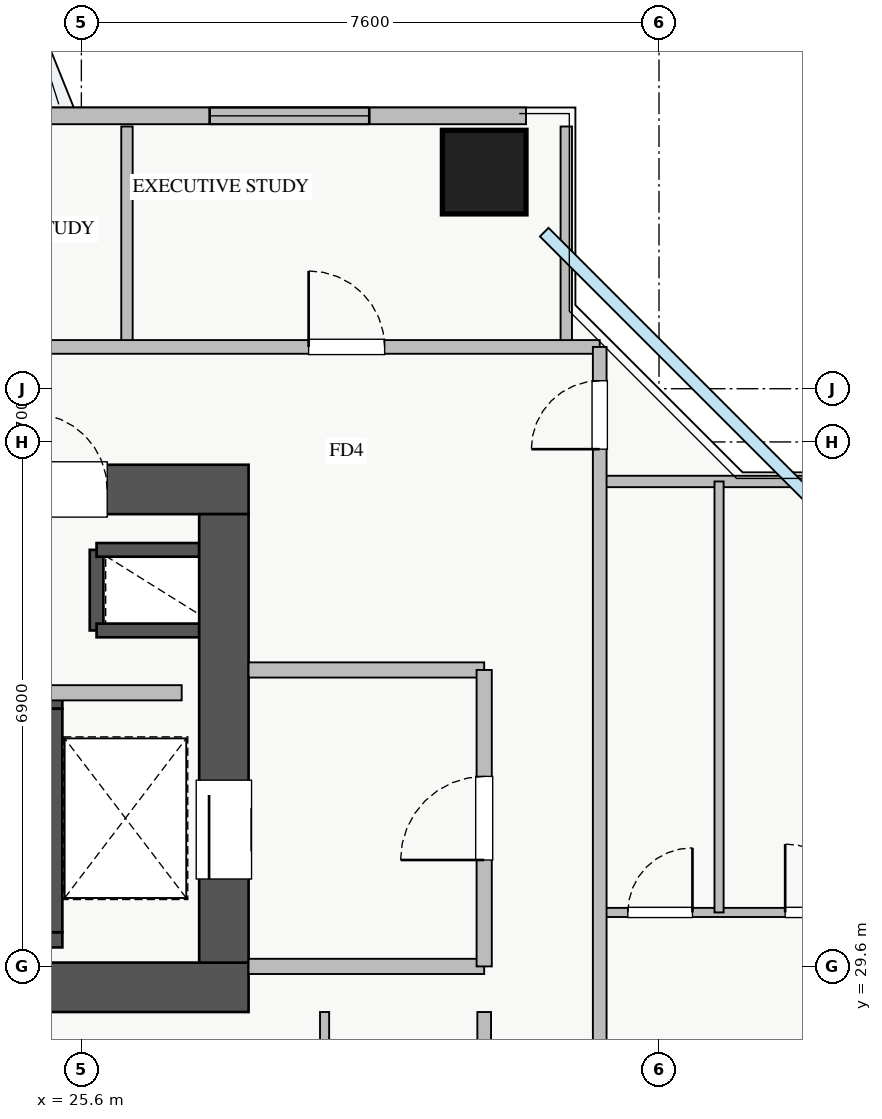
"""IFC4 building model, lengths in metres.
Left out: names, types, materials, properties, quantities, classifications, styles, units other than length and angle.
Written with IfcOpenShell. Run it as: python <this file> out.ifc"""

import sys

from ifc_helpers import new_model, si_unit, direction, frame, frame_2d, origin, origin_2d, place, context, subcontext, project, spatial, rectangle, extrude, source, transform, mapped, element, fill, save


model = new_model("IFC4")
c1 = context("Model", 3, precision=1e-05, world=origin(), true_north=direction((0.0, 1.0)))
c2 = subcontext(c1, "Body", "Model", "MODEL_VIEW")
j1 = project(units=[si_unit("LENGTHUNIT", "METRE"), si_unit("PLANEANGLEUNIT", "RADIAN")], contexts=[c1])
p1 = place(None, origin())
s1 = spatial("IfcSite", under=j1, at=p1, CompositionType="ELEMENT")
p2 = place(p1, origin())
s2 = spatial("IfcBuilding", under=s1, at=p2, CompositionType="ELEMENT")
p3 = place(p2, frame((0.0, 0.0, 116.5)))
s3 = spatial("IfcBuildingStorey", under=s2, at=p3, CompositionType="ELEMENT", Elevation=116.5)
p4 = place(p3, frame((25.8, 34.02, 0.0), z_axis=(0.0, 0.0, 1.0), x_axis=(0.0, 1.0, 0.0)))
e1 = element("IfcWall", 1, at=p4, inside=s3, PredefinedType="SHEAR", context=c2, shape_type="SweptSolid", body=[
    extrude(rectangle(XDim=1.06, YDim=0.18, at=frame_2d((0.53, 0.0))), origin(), (0.0, 0.0, 1.0), 3.07),
])
for number, where, z_axis, x_axis in (
    (2, (25.8, 35.08, 0.0), (0.0, 0.0, 1.0), (1.0, 0.0, 0.0)),
    (3, (25.8, 34.02, 0.0), (0.0, 0.0, 1.0), (1.0, 0.0, 0.0)),
):
    element("IfcWall", number, at=place(p3, frame(where, z_axis=z_axis, x_axis=x_axis)), inside=s3, PredefinedType="SHEAR", context=c2, shape_type="SweptSolid", body=[
        extrude(rectangle(XDim=1.35, YDim=0.18, at=frame_2d((0.675, 0.0))), origin(), (0.0, 0.0, 1.0), 3.07),
    ])
p5 = place(p3, frame((18.2, 29.95, 0.0), z_axis=(0.0, 0.0, 1.0), x_axis=(1.0, 0.0, 0.0)))
e4 = element("IfcWall", 4, at=p5, inside=s3, PredefinedType="SHEAR", context=c2, shape_type="SweptSolid", body=[
    extrude(rectangle(XDim=7.15, YDim=0.2, at=frame_2d((3.575, 0.0))), origin(), (0.0, 0.0, 1.0), 3.25),
])
p6 = place(p3, frame((18.2, 33.09, 0.0), z_axis=(0.0, 0.0, 1.0), x_axis=(1.0, 0.0, 0.0)))
e5 = element("IfcWall", 5, at=p6, inside=s3, PredefinedType="SHEAR", context=c2, shape_type="SweptSolid", body=[
    extrude(rectangle(XDim=7.15, YDim=0.2, at=frame_2d((3.575, 0.0))), origin(), (0.0, 0.0, 1.0), 3.25),
])
p7 = place(p6, frame((0.35, 0.0, 0.0)))
e6 = element("IfcOpeningElement", 6, at=p7, cuts=e5, PredefinedType="OPENING", context=c2, shape_type="SweptSolid", body=[
    extrude(rectangle(XDim=1.1, YDim=2.05, at=frame_2d((0.55, 1.025))), frame((0.0, 0.11, 0.0), z_axis=(0.0, -1.0, 0.0), x_axis=(1.0, 0.0, 0.0)), (0.0, 0.0, 1.0), 0.22),
])
p8 = place(p3, frame((25.25, 30.05, 0.0), z_axis=(0.0, 0.0, 1.0), x_axis=(0.0, 1.0, 0.0)))
e7 = element("IfcWall", 7, at=p8, inside=s3, PredefinedType="SHEAR", context=c2, shape_type="SweptSolid", body=[
    extrude(rectangle(XDim=2.94, YDim=0.2, at=frame_2d((1.47, 0.0))), origin(), (0.0, 0.0, 1.0), 3.25),
])
p9 = place(p3, frame((10.2, 29.325, 0.0), z_axis=(0.0, 0.0, 1.0), x_axis=(1.0, 0.0, 0.0)))
e8 = element("IfcWall", 8, at=p9, inside=s3, PredefinedType="SHEAR", context=c2, shape_type="SweptSolid", body=[
    extrude(rectangle(XDim=17.6, YDim=0.65, at=frame_2d((8.8, 0.0))), origin(), (0.0, 0.0, 1.0), 3.25),
])
p10 = place(p3, frame((10.2, 35.875, 0.0), z_axis=(0.0, 0.0, 1.0), x_axis=(1.0, 0.0, 0.0)))
e9 = element("IfcWall", 9, at=p10, inside=s3, PredefinedType="SHEAR", context=c2, shape_type="SweptSolid", body=[
    extrude(rectangle(XDim=17.6, YDim=0.65, at=frame_2d((8.8, 0.0))), origin(), (0.0, 0.0, 1.0), 3.25),
])
p11 = place(p10, frame((1.15, 0.0, 0.0)))
e10 = element("IfcOpeningElement", 10, at=p11, cuts=e9, PredefinedType="OPENING", context=c2, shape_type="SweptSolid", body=[
    extrude(rectangle(XDim=1.1, YDim=2.05, at=frame_2d((0.55, 1.025))), frame((0.0, 0.335, 0.0), z_axis=(0.0, -1.0, 0.0), x_axis=(1.0, 0.0, 0.0)), (0.0, 0.0, 1.0), 0.67),
])
p12 = place(p10, frame((8.3, 0.0, 0.0)))
e11 = element("IfcOpeningElement", 11, at=p12, cuts=e9, PredefinedType="OPENING", context=c2, shape_type="SweptSolid", body=[
    extrude(rectangle(XDim=1.1, YDim=2.05, at=frame_2d((0.55, 1.025))), frame((0.0, 0.335, 0.0), z_axis=(0.0, -1.0, 0.0), x_axis=(1.0, 0.0, 0.0)), (0.0, 0.0, 1.0), 0.67),
])
p13 = place(p10, frame((4.9, 0.0, 0.0)))
e12 = element("IfcOpeningElement", 12, at=p13, cuts=e9, PredefinedType="OPENING", context=c2, shape_type="SweptSolid", body=[
    extrude(rectangle(XDim=1.1, YDim=2.05, at=frame_2d((0.55, 1.025))), frame((0.0, 0.335, 0.0), z_axis=(0.0, -1.0, 0.0), x_axis=(1.0, 0.0, 0.0)), (0.0, 0.0, 1.0), 0.67),
])
p14 = place(p10, frame((14.74, 0.0, 0.0)))
e13 = element("IfcOpeningElement", 13, at=p14, cuts=e9, PredefinedType="OPENING", context=c2, shape_type="SweptSolid", body=[
    extrude(rectangle(XDim=1.0, YDim=2.05, at=frame_2d((0.5, 1.025))), frame((0.0, 0.335, 0.0), z_axis=(0.0, -1.0, 0.0), x_axis=(1.0, 0.0, 0.0)), (0.0, 0.0, 1.0), 0.67),
])
p15 = place(p10, frame((10.175, 0.0, 0.0)))
e14 = element("IfcOpeningElement", 14, at=p15, cuts=e9, PredefinedType="OPENING", context=c2, shape_type="SweptSolid", body=[
    extrude(rectangle(XDim=1.0, YDim=2.05, at=frame_2d((0.5, 1.025))), frame((0.0, 0.335, 0.0), z_axis=(0.0, -1.0, 0.0), x_axis=(1.0, 0.0, 0.0)), (0.0, 0.0, 1.0), 0.67),
])
p16 = place(p10, frame((12.625, 0.0, 0.0)))
e15 = element("IfcOpeningElement", 15, at=p16, cuts=e9, PredefinedType="OPENING", context=c2, shape_type="SweptSolid", body=[
    extrude(rectangle(XDim=1.0, YDim=2.05, at=frame_2d((0.5, 1.025))), frame((0.0, 0.335, 0.0), z_axis=(0.0, -1.0, 0.0), x_axis=(1.0, 0.0, 0.0)), (0.0, 0.0, 1.0), 0.67),
])
p17 = place(p3, frame((27.475, 29.65, 0.0), z_axis=(0.0, 0.0, 1.0), x_axis=(0.0, 1.0, 0.0)))
e16 = element("IfcWall", 16, at=p17, inside=s3, PredefinedType="SHEAR", context=c2, shape_type="SweptSolid", body=[
    extrude(rectangle(XDim=5.9, YDim=0.65, at=frame_2d((2.95, 0.0))), origin(), (0.0, 0.0, 1.0), 3.25),
])
p18 = place(p17, frame((1.1, 0.0, 0.0)))
e17 = element("IfcOpeningElement", 17, at=p18, cuts=e16, PredefinedType="OPENING", context=c2, shape_type="SweptSolid", body=[
    extrude(rectangle(XDim=1.3, YDim=2.05, at=frame_2d((0.65, 1.025))), frame((0.0, 0.335, 0.0), z_axis=(0.0, -1.0, 0.0), x_axis=(1.0, 0.0, 0.0)), (0.0, 0.0, 1.0), 0.67),
])
m1 = source(origin(), c2, "Body", "SweptSolid", [
    extrude(rectangle(XDim=1.1, YDim=1.1, at=origin_2d()), origin(), (0.0, 0.0, 1.0), 3.25),
])
p19 = place(p3, frame((30.9, 40.05, 0.0), z_axis=(0.0, 0.0, 1.0), x_axis=(1.0, 0.0, 0.0)))
e18 = element("IfcColumn", 18, at=p19, inside=s3, PredefinedType="COLUMN", context=c2, shape_type="MappedRepresentation", body=[
    mapped(m1, transform((0.0, 0.0, 0.0), x_axis=(1.0, 0.0, 0.0), y_axis=(0.0, 1.0, 0.0), z_axis=(0.0, 0.0, 1.0), scale=1.0)),
])
p20 = place(p3, frame((6.55, 40.79, 0.0), z_axis=(0.0, 0.0, 1.0), x_axis=(1.0, 0.0, 0.0)))
e19 = element("IfcWall", 19, at=p20, inside=s3, PredefinedType="STANDARD", context=c2, shape_type="SweptSolid", body=[
    extrude(rectangle(XDim=24.9, YDim=0.22, at=frame_2d((12.45, 0.0))), origin(), (0.0, 0.0, 1.0), 2.61),
])
p21 = place(p20, frame((13.3, 0.0, 0.0)))
e20 = element("IfcOpeningElement", 20, at=p21, cuts=e19, PredefinedType="OPENING", context=c2, shape_type="SweptSolid", body=[
    extrude(rectangle(XDim=1.2, YDim=2.1, at=frame_2d((0.6, 1.05))), frame((0.0, 0.12, 0.0), z_axis=(0.0, -1.0, 0.0), x_axis=(1.0, 0.0, 0.0)), (0.0, 0.0, 1.0), 0.24),
])
p22 = place(p20, frame((3.635, 0.0, 0.9)))
e21 = element("IfcOpeningElement", 21, at=p22, cuts=e19, PredefinedType="OPENING", context=c2, shape_type="SweptSolid", body=[
    extrude(rectangle(XDim=2.4, YDim=1.5, at=frame_2d((1.2, 0.75))), frame((0.0, 0.12, 0.0), z_axis=(0.0, -1.0, 0.0), x_axis=(1.0, 0.0, 0.0)), (0.0, 0.0, 1.0), 0.24),
])
p23 = place(p20, frame((8.438, 0.0, 0.9)))
e22 = element("IfcOpeningElement", 22, at=p23, cuts=e19, PredefinedType="OPENING", context=c2, shape_type="SweptSolid", body=[
    extrude(rectangle(XDim=1.8, YDim=1.45, at=frame_2d((0.9, 0.725))), frame((0.0, 0.12, 0.0), z_axis=(0.0, -1.0, 0.0), x_axis=(1.0, 0.0, 0.0)), (0.0, 0.0, 1.0), 0.24),
])
p24 = place(p20, frame((14.813, 0.0, 0.9)))
e23 = element("IfcOpeningElement", 23, at=p24, cuts=e19, PredefinedType="OPENING", context=c2, shape_type="SweptSolid", body=[
    extrude(rectangle(XDim=1.5, YDim=1.45, at=frame_2d((0.75, 0.725))), frame((0.0, 0.12, 0.0), z_axis=(0.0, -1.0, 0.0), x_axis=(1.0, 0.0, 0.0)), (0.0, 0.0, 1.0), 0.24),
])
p25 = place(p20, frame((20.738, 0.0, 0.9)))
e24 = element("IfcOpeningElement", 24, at=p25, cuts=e19, PredefinedType="OPENING", context=c2, shape_type="SweptSolid", body=[
    extrude(rectangle(XDim=2.1, YDim=1.48, at=frame_2d((1.05, 0.74))), frame((0.0, 0.12, 0.0), z_axis=(0.0, -1.0, 0.0), x_axis=(1.0, 0.0, 0.0)), (0.0, 0.0, 1.0), 0.24),
])
p26 = place(p20, frame((0.258, 0.0, 0.9)))
e25 = element("IfcOpeningElement", 25, at=p26, cuts=e19, PredefinedType="OPENING", context=c2, shape_type="SweptSolid", body=[
    extrude(rectangle(XDim=1.8, YDim=1.5, at=frame_2d((0.9, 0.75))), frame((0.0, 0.12, 0.0), z_axis=(0.0, -1.0, 0.0), x_axis=(1.0, 0.0, 0.0)), (0.0, 0.0, 1.0), 0.24),
])
for number, where, z_axis, x_axis in (
    (26, (27.8, 29.6, 0.0), (0.0, 0.0, 1.0), (1.0, 0.0, 0.0)),
    (27, (27.8, 33.5, 0.0), (0.0, 0.0, 1.0), (1.0, 0.0, 0.0)),
):
    element("IfcWall", number, at=place(p3, frame(where, z_axis=z_axis, x_axis=x_axis)), inside=s3, PredefinedType="PARTITIONING", context=c2, shape_type="SweptSolid", body=[
        extrude(rectangle(XDim=3.1, YDim=0.2, at=frame_2d((1.55, 0.0))), origin(), (0.0, 0.0, 1.0), 3.07),
    ])
p27 = place(p3, frame((30.9, 29.6, 0.0), z_axis=(0.0, 0.0, 1.0), x_axis=(0.0, 1.0, 0.0)))
e28 = element("IfcWall", 28, at=p27, inside=s3, PredefinedType="PARTITIONING", context=c2, shape_type="SweptSolid", body=[
    extrude(rectangle(XDim=3.9, YDim=0.2, at=frame_2d((1.95, 0.0))), origin(), (0.0, 0.0, 1.0), 3.07),
])
p28 = place(p27, frame((1.4, 0.0, 0.0)))
e29 = element("IfcOpeningElement", 29, at=p28, cuts=e28, PredefinedType="OPENING", context=c2, shape_type="SweptSolid", body=[
    extrude(rectangle(XDim=1.1, YDim=2.05, at=frame_2d((0.55, 1.025))), frame((0.0, 0.11, 0.0), z_axis=(0.0, -1.0, 0.0), x_axis=(1.0, 0.0, 0.0)), (0.0, 0.0, 1.0), 0.22),
])
p29 = place(p3, frame((21.75, 33.2, 0.0), z_axis=(0.0, 0.0, 1.0), x_axis=(1.0, 0.0, 0.0)))
e30 = element("IfcWall", 30, at=p29, inside=s3, PredefinedType="PARTITIONING", context=c2, shape_type="SweptSolid", body=[
    extrude(rectangle(XDim=5.17, YDim=0.2, at=frame_2d((2.585, 0.0))), origin(), (0.0, 0.0, 1.0), 3.07),
])
for number, where, z_axis, x_axis in (
    (31, (26.2, 37.75, 0.0), (0.0, 0.0, 1.0), (0.0, 1.0, 0.0)),
    (32, (31.98, 37.75, 0.0), (0.0, 0.0, 1.0), (0.0, 1.0, 0.0)),
):
    element("IfcWall", number, at=place(p3, frame(where, z_axis=z_axis, x_axis=x_axis)), inside=s3, PredefinedType="PARTITIONING", context=c2, shape_type="SweptSolid", body=[
        extrude(rectangle(XDim=2.9, YDim=0.15, at=frame_2d((1.45, 0.0))), origin(), (0.0, 0.0, 1.0), 3.07),
    ])
p30 = place(p3, frame((8.85, 37.75, 0.0), z_axis=(0.0, 0.0, 1.0), x_axis=(1.0, 0.0, 0.0)))
e33 = element("IfcWall", 33, at=p30, inside=s3, PredefinedType="PARTITIONING", context=c2, shape_type="SweptSolid", body=[
    extrude(rectangle(XDim=23.57, YDim=0.18, at=frame_2d((11.785, 0.0))), origin(), (0.0, 0.0, 1.0), 3.07),
])
p31 = place(p30, frame((2.035, 0.0, 0.0)))
e34 = element("IfcOpeningElement", 34, at=p31, cuts=e33, PredefinedType="OPENING", context=c2, shape_type="SweptSolid", body=[
    extrude(rectangle(XDim=1.0, YDim=2.05, at=frame_2d((0.5, 1.025))), frame((0.0, 0.1, 0.0), z_axis=(0.0, -1.0, 0.0), x_axis=(1.0, 0.0, 0.0)), (0.0, 0.0, 1.0), 0.2),
])
p32 = place(p30, frame((7.16, 0.0, 0.0)))
e35 = element("IfcOpeningElement", 35, at=p32, cuts=e33, PredefinedType="OPENING", context=c2, shape_type="SweptSolid", body=[
    extrude(rectangle(XDim=1.0, YDim=2.05, at=frame_2d((0.5, 1.025))), frame((0.0, 0.1, 0.0), z_axis=(0.0, -1.0, 0.0), x_axis=(1.0, 0.0, 0.0)), (0.0, 0.0, 1.0), 0.2),
])
p33 = place(p30, frame((13.3, 0.0, 0.0)))
e36 = element("IfcOpeningElement", 36, at=p33, cuts=e33, PredefinedType="OPENING", context=c2, shape_type="SweptSolid", body=[
    extrude(rectangle(XDim=1.0, YDim=2.05, at=frame_2d((0.5, 1.025))), frame((0.0, 0.1, 0.0), z_axis=(0.0, -1.0, 0.0), x_axis=(1.0, 0.0, 0.0)), (0.0, 0.0, 1.0), 0.2),
])
p34 = place(p30, frame((19.74, 0.0, 0.0)))
e37 = element("IfcOpeningElement", 37, at=p34, cuts=e33, PredefinedType="OPENING", context=c2, shape_type="SweptSolid", body=[
    extrude(rectangle(XDim=1.0, YDim=2.05, at=frame_2d((0.5, 1.025))), frame((0.0, 0.1, 0.0), z_axis=(0.0, -1.0, 0.0), x_axis=(1.0, 0.0, 0.0)), (0.0, 0.0, 1.0), 0.2),
])
p35 = place(p3, frame((32.42, 35.98, 0.0), z_axis=(0.0, 0.0, 1.0), x_axis=(1.0, 0.0, 0.0)))
e38 = element("IfcWall", 38, at=p35, inside=s3, PredefinedType="PARTITIONING", context=c2, shape_type="SweptSolid", body=[
    extrude(rectangle(XDim=4.23, YDim=0.15, at=frame_2d((2.115, 0.0))), origin(), (0.0, 0.0, 1.0), 3.07),
])
p36 = place(p3, frame((32.42, 30.31, 0.0), z_axis=(0.0, 0.0, 1.0), x_axis=(1.0, 0.0, 0.0)))
e39 = element("IfcWall", 39, at=p36, inside=s3, PredefinedType="PLUMBINGWALL", context=c2, shape_type="SweptSolid", body=[
    extrude(rectangle(XDim=4.23, YDim=0.12, at=frame_2d((2.115, 0.0))), origin(), (0.0, 0.0, 1.0), 3.07),
])
p37 = place(p36, frame((0.37, 0.0, 0.0)))
e40 = element("IfcOpeningElement", 40, at=p37, cuts=e39, PredefinedType="OPENING", context=c2, shape_type="SweptSolid", body=[
    extrude(rectangle(XDim=0.85, YDim=2.05, at=frame_2d((0.425, 1.025))), frame((0.0, 0.07, 0.0), z_axis=(0.0, -1.0, 0.0), x_axis=(1.0, 0.0, 0.0)), (0.0, 0.0, 1.0), 0.14),
])
p38 = place(p36, frame((2.44, 0.0, 0.0)))
e41 = element("IfcOpeningElement", 41, at=p38, cuts=e39, PredefinedType="OPENING", context=c2, shape_type="SweptSolid", body=[
    extrude(rectangle(XDim=0.9, YDim=2.05, at=frame_2d((0.45, 1.025))), frame((0.0, 0.07, 0.0), z_axis=(0.0, -1.0, 0.0), x_axis=(1.0, 0.0, 0.0)), (0.0, 0.0, 1.0), 0.14),
])
p39 = place(p3, frame((33.99, 30.31, 0.0), z_axis=(0.0, 0.0, 1.0), x_axis=(0.0, 1.0, 0.0)))
e42 = element("IfcWall", 42, at=p39, inside=s3, PredefinedType="PLUMBINGWALL", context=c2, shape_type="SweptSolid", body=[
    extrude(rectangle(XDim=5.67, YDim=0.12, at=frame_2d((2.835, 0.0))), origin(), (0.0, 0.0, 1.0), 3.07),
])
p40 = place(p3, frame((32.42, 8.25, 0.0), z_axis=(0.0, 0.0, 1.0), x_axis=(0.0, 1.0, 0.0)))
e43 = element("IfcWall", 43, at=p40, inside=s3, PredefinedType="PARTITIONING", context=c2, shape_type="SweptSolid", body=[
    extrude(rectangle(XDim=29.5, YDim=0.18, at=frame_2d((14.75, 0.0))), origin(), (0.0, 0.0, 1.0), 3.07),
])
p41 = place(p40, frame((28.155, 0.0, 0.0)))
e44 = element("IfcOpeningElement", 44, at=p41, cuts=e43, PredefinedType="OPENING", context=c2, shape_type="SweptSolid", body=[
    extrude(rectangle(XDim=0.9, YDim=2.05, at=frame_2d((0.45, 1.025))), frame((0.0, 0.1, 0.0), z_axis=(0.0, -1.0, 0.0), x_axis=(1.0, 0.0, 0.0)), (0.0, 0.0, 1.0), 0.2),
])
p42 = place(p40, frame((0.445, 0.0, 0.0)))
e45 = element("IfcOpeningElement", 45, at=p42, cuts=e43, PredefinedType="OPENING", context=c2, shape_type="SweptSolid", body=[
    extrude(rectangle(XDim=0.9, YDim=2.05, at=frame_2d((0.45, 1.025))), frame((0.0, 0.1, 0.0), z_axis=(0.0, -1.0, 0.0), x_axis=(1.0, 0.0, 0.0)), (0.0, 0.0, 1.0), 0.2),
])
p43 = place(p40, frame((4.76, 0.0, 0.0)))
e46 = element("IfcOpeningElement", 46, at=p43, cuts=e43, PredefinedType="OPENING", context=c2, shape_type="SweptSolid", body=[
    extrude(rectangle(XDim=1.0, YDim=2.05, at=frame_2d((0.5, 1.025))), frame((0.0, 0.1, 0.0), z_axis=(0.0, -1.0, 0.0), x_axis=(1.0, 0.0, 0.0)), (0.0, 0.0, 1.0), 0.2),
])
p44 = place(p40, frame((18.04, 0.0, 0.0)))
e47 = element("IfcOpeningElement", 47, at=p44, cuts=e43, PredefinedType="OPENING", context=c2, shape_type="SweptSolid", body=[
    extrude(rectangle(XDim=1.0, YDim=2.05, at=frame_2d((0.5, 1.025))), frame((0.0, 0.1, 0.0), z_axis=(0.0, -1.0, 0.0), x_axis=(1.0, 0.0, 0.0)), (0.0, 0.0, 1.0), 0.2),
])
p45 = place(p3, frame((28.8, 26.11, 0.0), z_axis=(0.0, 0.0, 1.0), x_axis=(0.0, 1.0, 0.0)))
e48 = element("IfcWall", 48, at=p45, inside=s3, PredefinedType="PLUMBINGWALL", context=c2, shape_type="SweptSolid", body=[
    extrude(rectangle(XDim=2.89, YDim=0.12, at=frame_2d((1.445, 0.0))), origin(), (0.0, 0.0, 1.0), 3.07),
])
p46 = place(p3, frame((30.9, 17.0, 0.0), z_axis=(0.0, 0.0, 1.0), x_axis=(0.0, 1.0, 0.0)))
e49 = element("IfcWall", 49, at=p46, inside=s3, PredefinedType="PARTITIONING", context=c2, shape_type="SweptSolid", body=[
    extrude(rectangle(XDim=12.0, YDim=0.18, at=frame_2d((6.0, 0.0))), origin(), (0.0, 0.0, 1.0), 3.07),
])
p47 = place(p46, frame((0.855, 0.0, 0.0)))
e50 = element("IfcOpeningElement", 50, at=p47, cuts=e49, PredefinedType="OPENING", context=c2, shape_type="SweptSolid", body=[
    extrude(rectangle(XDim=1.0, YDim=2.05, at=frame_2d((0.5, 1.025))), frame((0.0, 0.1, 0.0), z_axis=(0.0, -1.0, 0.0), x_axis=(1.0, 0.0, 0.0)), (0.0, 0.0, 1.0), 0.2),
])
p48 = place(p46, frame((6.725, 0.0, 0.0)))
e51 = element("IfcOpeningElement", 51, at=p48, cuts=e49, PredefinedType="OPENING", context=c2, shape_type="SweptSolid", body=[
    extrude(rectangle(XDim=1.0, YDim=2.05, at=frame_2d((0.5, 1.025))), frame((0.0, 0.1, 0.0), z_axis=(0.0, -1.0, 0.0), x_axis=(1.0, 0.0, 0.0)), (0.0, 0.0, 1.0), 0.2),
])
m2 = source(origin(), c2, "Body", "SweptSolid", [
    extrude(rectangle(XDim=2.1, YDim=1.48, at=frame_2d((1.05, 0.74))), frame((0.0, 0.03, 0.0), z_axis=(0.0, -1.0, 0.0), x_axis=(1.0, 0.0, 0.0)), (0.0, 0.0, 1.0), 0.06),
])
p49 = place(p25, origin())
e52 = element("IfcWindow", 52, at=p49, inside=s3, PartitioningType="TRIPLE_PANEL_VERTICAL", PredefinedType="WINDOW", context=c2, shape_type="MappedRepresentation", body=[
    mapped(m2, transform((0.0, 0.0, 0.0), x_axis=(1.0, 0.0, 0.0), y_axis=(0.0, 1.0, 0.0), z_axis=(0.0, 0.0, 1.0), scale=1.0)),
])
fill(e24, e52)
m3 = source(origin(), c2, "Body", "SweptSolid", [
    extrude(rectangle(XDim=1.3, YDim=2.05, at=frame_2d((0.65, 1.025))), frame((0.0, 0.025, 0.0), z_axis=(0.0, -1.0, 0.0), x_axis=(1.0, 0.0, 0.0)), (0.0, 0.0, 1.0), 0.05),
])
p50 = place(p18, origin())
e53 = element("IfcDoor", 53, at=p50, inside=s3, OperationType="SLIDING_TO_LEFT", PredefinedType="DOOR", context=c2, shape_type="MappedRepresentation", body=[
    mapped(m3, transform((0.0, 0.0, 0.0), x_axis=(1.0, 0.0, 0.0), y_axis=(0.0, 1.0, 0.0), z_axis=(0.0, 0.0, 1.0), scale=1.0)),
])
fill(e17, e53)
m4 = source(origin(), c2, "Body", "SweptSolid", [
    extrude(rectangle(XDim=1.0, YDim=2.05, at=frame_2d((0.5, 1.025))), frame((0.0, 0.025, 0.0), z_axis=(0.0, -1.0, 0.0), x_axis=(1.0, 0.0, 0.0)), (0.0, 0.0, 1.0), 0.05),
])
p51 = place(p14, origin())
e54 = element("IfcDoor", 54, at=p51, inside=s3, OperationType="SINGLE_SWING_LEFT", PredefinedType="DOOR", context=c2, shape_type="MappedRepresentation", body=[
    mapped(m4, transform((0.0, 0.0, 0.0), x_axis=(1.0, 0.0, 0.0), y_axis=(0.0, 1.0, 0.0), z_axis=(0.0, 0.0, 1.0), scale=1.0)),
])
fill(e13, e54)
m5 = source(origin(), c2, "Body", "SweptSolid", [
    extrude(rectangle(XDim=1.1, YDim=2.05, at=frame_2d((0.55, 1.025))), frame((0.0, 0.025, 0.0), z_axis=(0.0, -1.0, 0.0), x_axis=(1.0, 0.0, 0.0)), (0.0, 0.0, 1.0), 0.05),
])
p52 = place(p28, origin())
e55 = element("IfcDoor", 55, at=p52, inside=s3, OperationType="SINGLE_SWING_LEFT", PredefinedType="DOOR", context=c2, shape_type="MappedRepresentation", body=[
    mapped(m5, transform((0.0, 0.0, 0.0), x_axis=(1.0, 0.0, 0.0), y_axis=(0.0, 1.0, 0.0), z_axis=(0.0, 0.0, 1.0), scale=1.0)),
])
fill(e29, e55)
p53 = place(p34, origin())
e56 = element("IfcDoor", 56, at=p53, inside=s3, OperationType="SINGLE_SWING_LEFT", PredefinedType="DOOR", context=c2, shape_type="MappedRepresentation", body=[
    mapped(m4, transform((0.0, 0.0, 0.0), x_axis=(1.0, 0.0, 0.0), y_axis=(0.0, 1.0, 0.0), z_axis=(0.0, 0.0, 1.0), scale=1.0)),
])
fill(e37, e56)
m6 = source(origin(), c2, "Body", "SweptSolid", [
    extrude(rectangle(XDim=0.85, YDim=2.05, at=frame_2d((0.425, 1.025))), frame((0.0, 0.025, 0.0), z_axis=(0.0, -1.0, 0.0), x_axis=(1.0, 0.0, 0.0)), (0.0, 0.0, 1.0), 0.05),
])
p54 = place(p37, origin())
e57 = element("IfcDoor", 57, at=p54, inside=s3, OperationType="SINGLE_SWING_RIGHT", PredefinedType="DOOR", context=c2, shape_type="MappedRepresentation", body=[
    mapped(m6, transform((0.0, 0.0, 0.0), x_axis=(1.0, 0.0, 0.0), y_axis=(0.0, 1.0, 0.0), z_axis=(0.0, 0.0, 1.0), scale=1.0)),
])
fill(e40, e57)
m7 = source(origin(), c2, "Body", "SweptSolid", [
    extrude(rectangle(XDim=0.9, YDim=2.05, at=frame_2d((0.45, 1.025))), frame((0.0, 0.025, 0.0), z_axis=(0.0, -1.0, 0.0), x_axis=(1.0, 0.0, 0.0)), (0.0, 0.0, 1.0), 0.05),
])
p55 = place(p38, origin())
e58 = element("IfcDoor", 58, at=p55, inside=s3, OperationType="SINGLE_SWING_LEFT", PredefinedType="DOOR", context=c2, shape_type="MappedRepresentation", body=[
    mapped(m7, transform((0.0, 0.0, 0.0), x_axis=(1.0, 0.0, 0.0), y_axis=(0.0, 1.0, 0.0), z_axis=(0.0, 0.0, 1.0), scale=1.0)),
])
fill(e41, e58)
p56 = place(p41, origin())
e59 = element("IfcDoor", 59, at=p56, inside=s3, OperationType="SINGLE_SWING_LEFT", PredefinedType="DOOR", context=c2, shape_type="MappedRepresentation", body=[
    mapped(m7, transform((0.0, 0.0, 0.0), x_axis=(1.0, 0.0, 0.0), y_axis=(0.0, 1.0, 0.0), z_axis=(0.0, 0.0, 1.0), scale=1.0)),
])
fill(e44, e59)
save(model, sys.argv[1])
